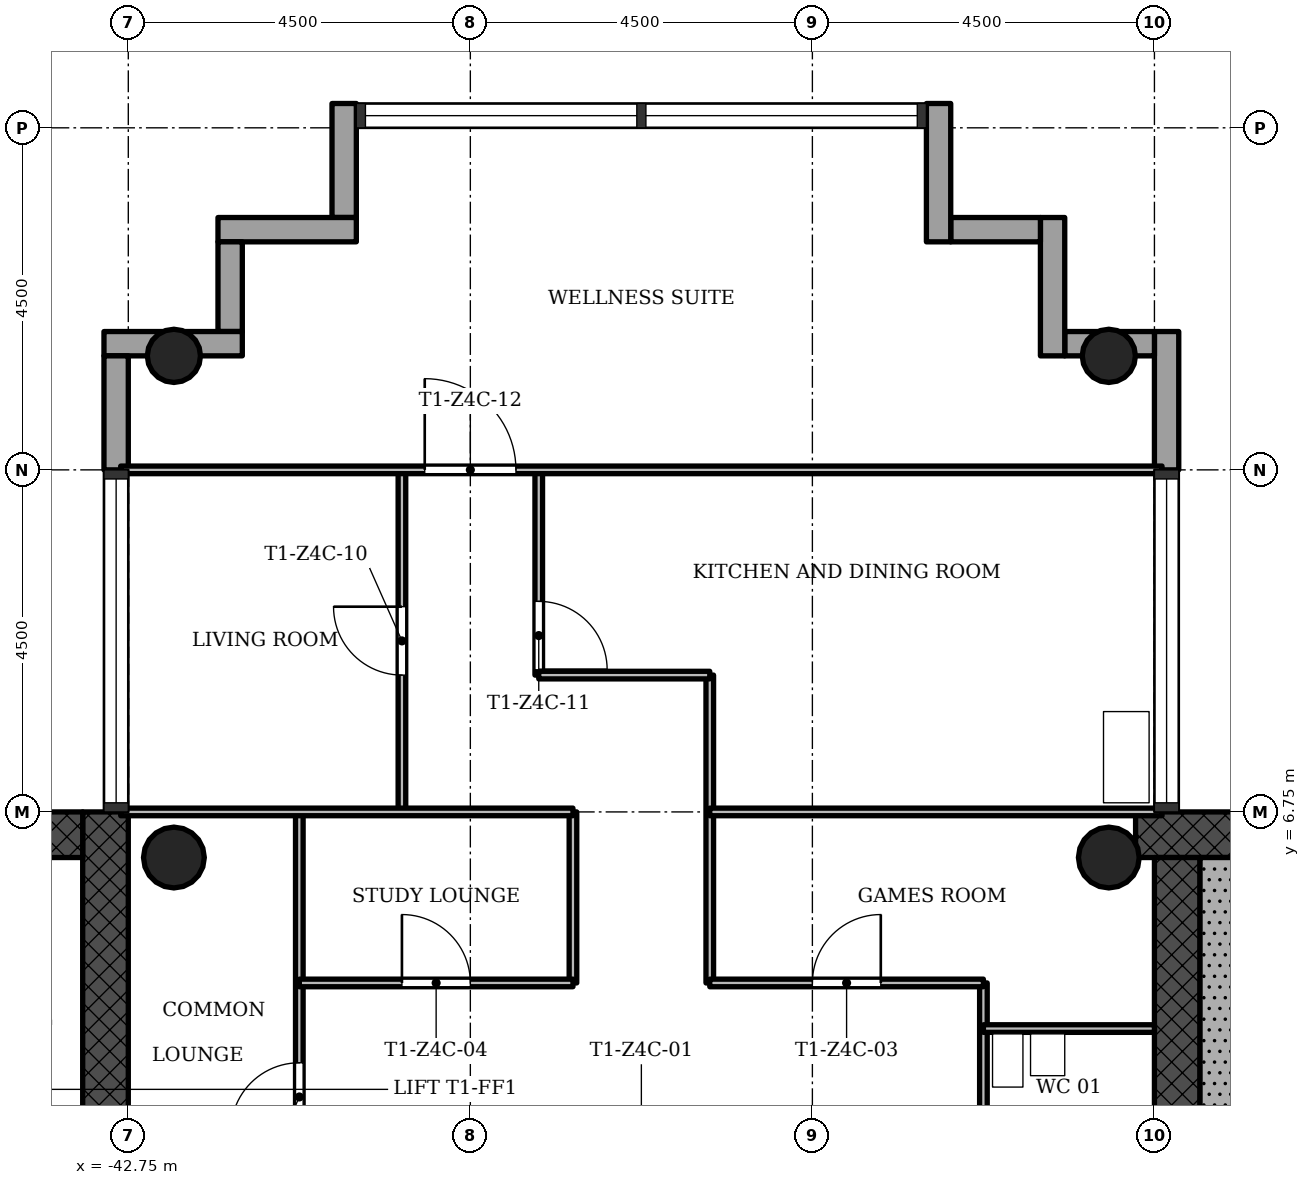
"""IFC4 building model, lengths in metres.
Left out: names, types, materials, properties, quantities, classifications, styles, units other than length and angle.
Written with IfcOpenShell. Run it as: python <this file> out.ifc"""

import sys

from ifc_helpers import new_model, si_unit, direction, frame, frame_2d, origin, origin_2d, place, context, subcontext, project, spatial, rectangle, hollow_circle, extrude, element, fill, save


model = new_model("IFC4")
c1 = context("Model", 3, precision=1e-05, world=origin(), true_north=direction((0.0, 1.0)))
c2 = subcontext(c1, "Body", "Model", "MODEL_VIEW")
j1 = project(units=[si_unit("LENGTHUNIT", "METRE"), si_unit("PLANEANGLEUNIT", "RADIAN")], contexts=[c1])
p1 = place(None, origin())
s1 = spatial("IfcSite", under=j1, at=p1, CompositionType="ELEMENT")
p2 = place(p1, origin())
s2 = spatial("IfcBuilding", under=s1, at=p2, CompositionType="ELEMENT")
p3 = place(p2, frame((0.0, 0.0, 192.6)))
s3 = spatial("IfcBuildingStorey", under=s2, at=p3, CompositionType="ELEMENT", Elevation=192.6)
p4 = place(p3, frame((-20.602, 6.45, 0.0), z_axis=(0.0, 0.0, 1.0), x_axis=(-1.0, 0.0, 0.0)))
e1 = element("IfcWall", 1, at=p4, inside=s3, PredefinedType="SHEAR", context=c2, shape_type="SweptSolid", body=[
    extrude(rectangle(XDim=8.896, YDim=0.6, at=frame_2d((4.448, 0.0))), origin(), (0.0, 0.0, 1.0), 3.4),
])
p5 = place(p3, frame((-28.95, 6.15, 0.0), z_axis=(0.0, 0.0, 1.0), x_axis=(0.0, -1.0, 0.0)))
e2 = element("IfcWall", 2, at=p5, inside=s3, PredefinedType="SHEAR", context=c2, shape_type="SweptSolid", body=[
    extrude(rectangle(XDim=12.9, YDim=0.6, at=frame_2d((6.45, 0.0))), origin(), (0.0, 0.0, 1.0), 3.4),
])
p6 = place(p5, frame((5.25, 0.0, 0.0)))
e3 = element("IfcOpeningElement", 3, at=p6, cuts=e2, PredefinedType="OPENING", context=c2, shape_type="SweptSolid", body=[
    extrude(rectangle(XDim=1.8, YDim=2.1, at=frame_2d((0.9, 1.05))), frame((0.0, 0.31, 0.0), z_axis=(0.0, -1.0, 0.0), x_axis=(1.0, 0.0, 0.0)), (0.0, 0.0, 1.0), 0.62),
])
p7 = place(p3, frame((-43.05, -6.15, 0.0), z_axis=(0.0, 0.0, 1.0), x_axis=(0.0, 1.0, 0.0)))
e4 = element("IfcWall", 4, at=p7, inside=s3, PredefinedType="SHEAR", context=c2, shape_type="SweptSolid", body=[
    extrude(rectangle(XDim=12.9, YDim=0.6, at=frame_2d((6.45, 0.0))), origin(), (0.0, 0.0, 1.0), 3.4),
])
p8 = place(p7, frame((5.25, 0.0, 0.0)))
e5 = element("IfcOpeningElement", 5, at=p8, cuts=e4, PredefinedType="OPENING", context=c2, shape_type="SweptSolid", body=[
    extrude(rectangle(XDim=1.8, YDim=2.1, at=frame_2d((0.9, 1.05))), frame((0.0, 0.31, 0.0), z_axis=(0.0, -1.0, 0.0), x_axis=(1.0, 0.0, 0.0)), (0.0, 0.0, 1.0), 0.62),
])
p9 = place(p3, frame((-43.35, 6.45, 0.0), z_axis=(0.0, 0.0, 1.0), x_axis=(-1.0, 0.0, 0.0)))
e6 = element("IfcWall", 6, at=p9, inside=s3, PredefinedType="SHEAR", context=c2, shape_type="SweptSolid", body=[
    extrude(rectangle(XDim=8.4, YDim=0.6, at=frame_2d((4.2, 0.0))), origin(), (0.0, 0.0, 1.0), 3.4),
])
for number, where, z_axis, x_axis in (
    (7, (-29.85, 12.75, 0.0), (0.0, 0.0, 1.0), (1.0, 0.0, 0.0)),
    (8, (-42.15, 12.75, 0.0), (0.0, 0.0, 1.0), (1.0, 0.0, 0.0)),
):
    element("IfcColumn", number, at=place(p3, frame(where, z_axis=z_axis, x_axis=x_axis)), inside=s3, PredefinedType="COLUMN", context=c2, shape_type="SweptSolid", body=[
        extrude(hollow_circle(Radius=0.35, WallThickness=0.025, at=origin_2d()), origin(), (0.0, 0.0, 1.0), 3.4),
    ])
for number, where, z_axis, x_axis in (
    (9, (-29.85, 6.15, 0.0), (0.0, 0.0, 1.0), (1.0, 0.0, 0.0)),
    (10, (-42.15, 6.15, 0.0), (0.0, 0.0, 1.0), (1.0, 0.0, 0.0)),
):
    element("IfcColumn", number, at=place(p3, frame(where, z_axis=z_axis, x_axis=x_axis)), inside=s3, PredefinedType="COLUMN", context=c2, shape_type="SweptSolid", body=[
        extrude(hollow_circle(Radius=0.4, WallThickness=0.028, at=origin_2d()), origin(), (0.0, 0.0, 1.0), 3.4),
    ])
p10 = place(p3, frame((-29.09, 11.25, -0.3), z_axis=(0.0, 0.0, 1.0), x_axis=(0.0, 1.0, 0.0)))
e11 = element("IfcWall", 11, at=p10, inside=s3, PredefinedType="STANDARD", context=c2, shape_type="SweptSolid", body=[
    extrude(rectangle(XDim=1.82, YDim=0.32, at=frame_2d((0.91, 0.0))), origin(), (0.0, 0.0, 1.0), 3.4),
])
p11 = place(p3, frame((-29.25, 12.91, -0.3), z_axis=(0.0, 0.0, 1.0), x_axis=(-1.0, 0.0, 0.0)))
e12 = element("IfcWall", 12, at=p11, inside=s3, PredefinedType="STANDARD", context=c2, shape_type="SweptSolid", body=[
    extrude(rectangle(XDim=1.18, YDim=0.32, at=frame_2d((0.59, 0.0))), origin(), (0.0, 0.0, 1.0), 3.4),
])
p12 = place(p3, frame((-30.59, 12.75, -0.3), z_axis=(0.0, 0.0, 1.0), x_axis=(0.0, 1.0, 0.0)))
e13 = element("IfcWall", 13, at=p12, inside=s3, PredefinedType="STANDARD", context=c2, shape_type="SweptSolid", body=[
    extrude(rectangle(XDim=1.82, YDim=0.32, at=frame_2d((0.91, 0.0))), origin(), (0.0, 0.0, 1.0), 3.4),
])
p13 = place(p3, frame((-30.75, 14.41, -0.3), z_axis=(0.0, 0.0, 1.0), x_axis=(-1.0, 0.0, 0.0)))
e14 = element("IfcWall", 14, at=p13, inside=s3, PredefinedType="STANDARD", context=c2, shape_type="SweptSolid", body=[
    extrude(rectangle(XDim=1.18, YDim=0.32, at=frame_2d((0.59, 0.0))), origin(), (0.0, 0.0, 1.0), 3.4),
])
p14 = place(p3, frame((-32.09, 14.25, -0.3), z_axis=(0.0, 0.0, 1.0), x_axis=(0.0, 1.0, 0.0)))
e15 = element("IfcWall", 15, at=p14, inside=s3, PredefinedType="STANDARD", context=c2, shape_type="SweptSolid", body=[
    extrude(rectangle(XDim=1.82, YDim=0.32, at=frame_2d((0.91, 0.0))), origin(), (0.0, 0.0, 1.0), 3.4),
])
p15 = place(p3, frame((-39.91, 16.07, -0.3), z_axis=(0.0, 0.0, 1.0), x_axis=(0.0, -1.0, 0.0)))
e16 = element("IfcWall", 16, at=p15, inside=s3, PredefinedType="STANDARD", context=c2, shape_type="SweptSolid", body=[
    extrude(rectangle(XDim=1.5, YDim=0.32, at=frame_2d((0.75, 0.0))), origin(), (0.0, 0.0, 1.0), 3.4),
])
p16 = place(p3, frame((-39.75, 14.41, -0.3), z_axis=(0.0, 0.0, 1.0), x_axis=(-1.0, 0.0, 0.0)))
e17 = element("IfcWall", 17, at=p16, inside=s3, PredefinedType="STANDARD", context=c2, shape_type="SweptSolid", body=[
    extrude(rectangle(XDim=1.82, YDim=0.32, at=frame_2d((0.91, 0.0))), origin(), (0.0, 0.0, 1.0), 3.4),
])
p17 = place(p3, frame((-41.41, 14.25, -0.3), z_axis=(0.0, 0.0, 1.0), x_axis=(0.0, -1.0, 0.0)))
e18 = element("IfcWall", 18, at=p17, inside=s3, PredefinedType="STANDARD", context=c2, shape_type="SweptSolid", body=[
    extrude(rectangle(XDim=1.18, YDim=0.32, at=frame_2d((0.59, 0.0))), origin(), (0.0, 0.0, 1.0), 3.4),
])
p18 = place(p3, frame((-41.25, 12.91, -0.3), z_axis=(0.0, 0.0, 1.0), x_axis=(-1.0, 0.0, 0.0)))
e19 = element("IfcWall", 19, at=p18, inside=s3, PredefinedType="STANDARD", context=c2, shape_type="SweptSolid", body=[
    extrude(rectangle(XDim=1.82, YDim=0.32, at=frame_2d((0.91, 0.0))), origin(), (0.0, 0.0, 1.0), 3.4),
])
p19 = place(p3, frame((-42.91, 12.75, -0.3), z_axis=(0.0, 0.0, 1.0), x_axis=(0.0, -1.0, 0.0)))
e20 = element("IfcWall", 20, at=p19, inside=s3, PredefinedType="STANDARD", context=c2, shape_type="SweptSolid", body=[
    extrude(rectangle(XDim=1.5, YDim=0.32, at=frame_2d((0.75, 0.0))), origin(), (0.0, 0.0, 1.0), 3.4),
])
p20 = place(p3, frame((-40.5, 1.5, 0.0), z_axis=(0.0, 0.0, 1.0), x_axis=(0.0, 1.0, 0.0)))
e21 = element("IfcWall", 21, at=p20, inside=s3, PredefinedType="PARTITIONING", context=c2, shape_type="SweptSolid", body=[
    extrude(rectangle(XDim=5.25, YDim=0.1, at=frame_2d((2.625, 0.0))), origin(), (0.0, 0.0, 1.0), 3.0),
])
p21 = place(p20, frame((1.05, 0.0, 0.0)))
e22 = element("IfcOpeningElement", 22, at=p21, cuts=e21, PredefinedType="OPENING", context=c2, shape_type="SweptSolid", body=[
    extrude(rectangle(XDim=0.9, YDim=2.1, at=frame_2d((0.45, 1.05))), frame((0.0, 0.06, 0.0), z_axis=(0.0, -1.0, 0.0), x_axis=(1.0, 0.0, 0.0)), (0.0, 0.0, 1.0), 0.12),
])
p22 = place(p3, frame((-39.15, 6.75, 0.0), z_axis=(0.0, 0.0, 1.0), x_axis=(0.0, 1.0, 0.0)))
e23 = element("IfcWall", 23, at=p22, inside=s3, PredefinedType="PARTITIONING", context=c2, shape_type="SweptSolid", body=[
    extrude(rectangle(XDim=4.5, YDim=0.1, at=frame_2d((2.25, 0.0))), origin(), (0.0, 0.0, 1.0), 3.0),
])
p23 = place(p22, frame((1.8, 0.0, 0.0)))
e24 = element("IfcOpeningElement", 24, at=p23, cuts=e23, PredefinedType="OPENING", context=c2, shape_type="SweptSolid", body=[
    extrude(rectangle(XDim=0.9, YDim=2.1, at=frame_2d((0.45, 1.05))), frame((0.0, 0.06, 0.0), z_axis=(0.0, -1.0, 0.0), x_axis=(1.0, 0.0, 0.0)), (0.0, 0.0, 1.0), 0.12),
])
p24 = place(p3, frame((-37.35, 8.55, 0.0), z_axis=(0.0, 0.0, 1.0), x_axis=(0.0, 1.0, 0.0)))
e25 = element("IfcWall", 25, at=p24, inside=s3, PredefinedType="PARTITIONING", context=c2, shape_type="SweptSolid", body=[
    extrude(rectangle(XDim=2.7, YDim=0.1, at=frame_2d((1.35, 0.0))), origin(), (0.0, 0.0, 1.0), 3.0),
])
p25 = place(p24, frame((0.07, 0.0, 0.0)))
e26 = element("IfcOpeningElement", 26, at=p25, cuts=e25, PredefinedType="OPENING", context=c2, shape_type="SweptSolid", body=[
    extrude(rectangle(XDim=0.9, YDim=2.1, at=frame_2d((0.45, 1.05))), frame((0.0, 0.06, 0.0), z_axis=(0.0, -1.0, 0.0), x_axis=(1.0, 0.0, 0.0)), (0.0, 0.0, 1.0), 0.12),
])
p26 = place(p3, frame((-36.9, 4.5, 0.0), z_axis=(0.0, 0.0, 1.0), x_axis=(0.0, 1.0, 0.0)))
e27 = element("IfcWall", 27, at=p26, inside=s3, PredefinedType="PARTITIONING", context=c2, shape_type="SweptSolid", body=[
    extrude(rectangle(XDim=2.25, YDim=0.1, at=frame_2d((1.125, 0.0))), origin(), (0.0, 0.0, 1.0), 3.0),
])
p27 = place(p3, frame((-35.1, 4.5, 0.0), z_axis=(0.0, 0.0, 1.0), x_axis=(0.0, 1.0, 0.0)))
e28 = element("IfcWall", 28, at=p27, inside=s3, PredefinedType="PARTITIONING", context=c2, shape_type="SweptSolid", body=[
    extrude(rectangle(XDim=4.05, YDim=0.1, at=frame_2d((2.025, 0.0))), origin(), (0.0, 0.0, 1.0), 3.0),
])
p28 = place(p3, frame((-31.5, 1.5, 0.0), z_axis=(0.0, 0.0, 1.0), x_axis=(0.0, 1.0, 0.0)))
e29 = element("IfcWall", 29, at=p28, inside=s3, PredefinedType="PARTITIONING", context=c2, shape_type="SweptSolid", body=[
    extrude(rectangle(XDim=3.0, YDim=0.1, at=frame_2d((1.5, 0.0))), origin(), (0.0, 0.0, 1.0), 3.0),
])
p29 = place(p3, frame((-31.5, 3.9, 0.0), z_axis=(0.0, 0.0, 1.0), x_axis=(1.0, 0.0, 0.0)))
e30 = element("IfcWall", 30, at=p29, inside=s3, PredefinedType="PARTITIONING", context=c2, shape_type="SweptSolid", body=[
    extrude(rectangle(XDim=2.25, YDim=0.1, at=frame_2d((1.125, 0.0))), origin(), (0.0, 0.0, 1.0), 3.0),
])
p30 = place(p3, frame((-40.5, 4.5, 0.0), z_axis=(0.0, 0.0, 1.0), x_axis=(1.0, 0.0, 0.0)))
e31 = element("IfcWall", 31, at=p30, inside=s3, PredefinedType="PARTITIONING", context=c2, shape_type="SweptSolid", body=[
    extrude(rectangle(XDim=3.6, YDim=0.1, at=frame_2d((1.8, 0.0))), origin(), (0.0, 0.0, 1.0), 3.0),
])
p31 = place(p30, frame((1.35, 0.0, 0.0)))
e32 = element("IfcOpeningElement", 32, at=p31, cuts=e31, PredefinedType="OPENING", context=c2, shape_type="SweptSolid", body=[
    extrude(rectangle(XDim=0.9, YDim=2.1, at=frame_2d((0.45, 1.05))), frame((0.0, 0.06, 0.0), z_axis=(0.0, -1.0, 0.0), x_axis=(1.0, 0.0, 0.0)), (0.0, 0.0, 1.0), 0.12),
])
p32 = place(p3, frame((-35.1, 4.5, 0.0), z_axis=(0.0, 0.0, 1.0), x_axis=(1.0, 0.0, 0.0)))
e33 = element("IfcWall", 33, at=p32, inside=s3, PredefinedType="PARTITIONING", context=c2, shape_type="SweptSolid", body=[
    extrude(rectangle(XDim=3.6, YDim=0.1, at=frame_2d((1.8, 0.0))), origin(), (0.0, 0.0, 1.0), 3.0),
])
p33 = place(p32, frame((1.35, 0.0, 0.0)))
e34 = element("IfcOpeningElement", 34, at=p33, cuts=e33, PredefinedType="OPENING", context=c2, shape_type="SweptSolid", body=[
    extrude(rectangle(XDim=0.9, YDim=2.1, at=frame_2d((0.45, 1.05))), frame((0.0, 0.06, 0.0), z_axis=(0.0, -1.0, 0.0), x_axis=(1.0, 0.0, 0.0)), (0.0, 0.0, 1.0), 0.12),
])
for number, where, z_axis, x_axis in (
    (35, (-42.85, 6.75, 0.0), (0.0, 0.0, 1.0), (1.0, 0.0, 0.0)),
    (36, (-35.1, 6.75, 0.0), (0.0, 0.0, 1.0), (1.0, 0.0, 0.0)),
):
    element("IfcWall", number, at=place(p3, frame(where, z_axis=z_axis, x_axis=x_axis)), inside=s3, PredefinedType="PARTITIONING", context=c2, shape_type="SweptSolid", body=[
        extrude(rectangle(XDim=5.95, YDim=0.1, at=frame_2d((2.975, 0.0))), origin(), (0.0, 0.0, 1.0), 3.0),
    ])
p34 = place(p3, frame((-37.35, 8.55, 0.0), z_axis=(0.0, 0.0, 1.0), x_axis=(1.0, 0.0, 0.0)))
e37 = element("IfcWall", 37, at=p34, inside=s3, PredefinedType="PARTITIONING", context=c2, shape_type="SweptSolid", body=[
    extrude(rectangle(XDim=2.25, YDim=0.1, at=frame_2d((1.125, 0.0))), origin(), (0.0, 0.0, 1.0), 3.0),
])
p35 = place(p3, frame((-42.85, 11.25, 0.0), z_axis=(0.0, 0.0, 1.0), x_axis=(1.0, 0.0, 0.0)))
e38 = element("IfcWall", 38, at=p35, inside=s3, PredefinedType="PARTITIONING", context=c2, shape_type="SweptSolid", body=[
    extrude(rectangle(XDim=13.7, YDim=0.1, at=frame_2d((6.85, 0.0))), origin(), (0.0, 0.0, 1.0), 3.0),
])
p36 = place(p35, frame((4.0, 0.0, 0.0)))
e39 = element("IfcOpeningElement", 39, at=p36, cuts=e38, PredefinedType="OPENING", context=c2, shape_type="SweptSolid", body=[
    extrude(rectangle(XDim=1.2, YDim=2.1, at=frame_2d((0.6, 1.05))), frame((0.0, 0.06, 0.0), z_axis=(0.0, -1.0, 0.0), x_axis=(1.0, 0.0, 0.0)), (0.0, 0.0, 1.0), 0.12),
])
p37 = place(p3, frame((-28.35, 1.85, 0.0), z_axis=(0.0, 0.0, 1.0), x_axis=(0.0, 1.0, 0.0)))
e40 = element("IfcWall", 40, at=p37, inside=s3, PredefinedType="SHEAR", context=c2, shape_type="SweptSolid", body=[
    extrude(rectangle(XDim=4.3, YDim=0.6, at=frame_2d((2.15, 0.0))), origin(), (0.0, 0.0, 1.0), 3.4),
])
p38 = place(p33, origin())
e41 = element("IfcDoor", 41, at=p38, inside=s3, OperationType="SINGLE_SWING_LEFT", PredefinedType="DOOR", context=c2, shape_type="SweptSolid", body=[
    extrude(rectangle(XDim=0.9, YDim=2.1, at=frame_2d((0.45, 1.05))), frame((0.0, 0.025, 0.0), z_axis=(0.0, -1.0, 0.0), x_axis=(1.0, 0.0, 0.0)), (0.0, 0.0, 1.0), 0.05),
])
fill(e34, e41)
p39 = place(p31, origin())
e42 = element("IfcDoor", 42, at=p39, inside=s3, OperationType="SINGLE_SWING_RIGHT", PredefinedType="DOOR", context=c2, shape_type="SweptSolid", body=[
    extrude(rectangle(XDim=0.9, YDim=2.1, at=frame_2d((0.45, 1.05))), frame((0.0, 0.025, 0.0), z_axis=(0.0, -1.0, 0.0), x_axis=(1.0, 0.0, 0.0)), (0.0, 0.0, 1.0), 0.05),
])
fill(e32, e42)
p40 = place(p21, origin())
e43 = element("IfcDoor", 43, at=p40, inside=s3, OperationType="SINGLE_SWING_RIGHT", PredefinedType="DOOR", context=c2, shape_type="SweptSolid", body=[
    extrude(rectangle(XDim=0.9, YDim=2.1, at=frame_2d((0.45, 1.05))), frame((0.0, 0.025, 0.0), z_axis=(0.0, -1.0, 0.0), x_axis=(1.0, 0.0, 0.0)), (0.0, 0.0, 1.0), 0.05),
])
fill(e22, e43)
p41 = place(p23, origin())
e44 = element("IfcDoor", 44, at=p41, inside=s3, OperationType="SINGLE_SWING_LEFT", PredefinedType="DOOR", context=c2, shape_type="SweptSolid", body=[
    extrude(rectangle(XDim=0.9, YDim=2.1, at=frame_2d((0.45, 1.05))), frame((0.0, 0.025, 0.0), z_axis=(0.0, -1.0, 0.0), x_axis=(1.0, 0.0, 0.0)), (0.0, 0.0, 1.0), 0.05),
])
fill(e24, e44)
p42 = place(p25, origin())
e45 = element("IfcDoor", 45, at=p42, inside=s3, OperationType="SINGLE_SWING_LEFT", PredefinedType="DOOR", context=c2, shape_type="SweptSolid", body=[
    extrude(rectangle(XDim=0.9, YDim=2.1, at=frame_2d((0.45, 1.05))), frame((0.0, 0.025, 0.0), z_axis=(0.0, -1.0, 0.0), x_axis=(1.0, 0.0, 0.0)), (0.0, 0.0, 1.0), 0.05),
])
fill(e26, e45)
p43 = place(p36, origin())
e46 = element("IfcDoor", 46, at=p43, inside=s3, OperationType="SINGLE_SWING_RIGHT", PredefinedType="DOOR", context=c2, shape_type="SweptSolid", body=[
    extrude(rectangle(XDim=1.2, YDim=2.1, at=frame_2d((0.6, 1.05))), frame((0.0, 0.025, 0.0), z_axis=(0.0, -1.0, 0.0), x_axis=(1.0, 0.0, 0.0)), (0.0, 0.0, 1.0), 0.05),
])
fill(e39, e46)
save(model, sys.argv[1])
